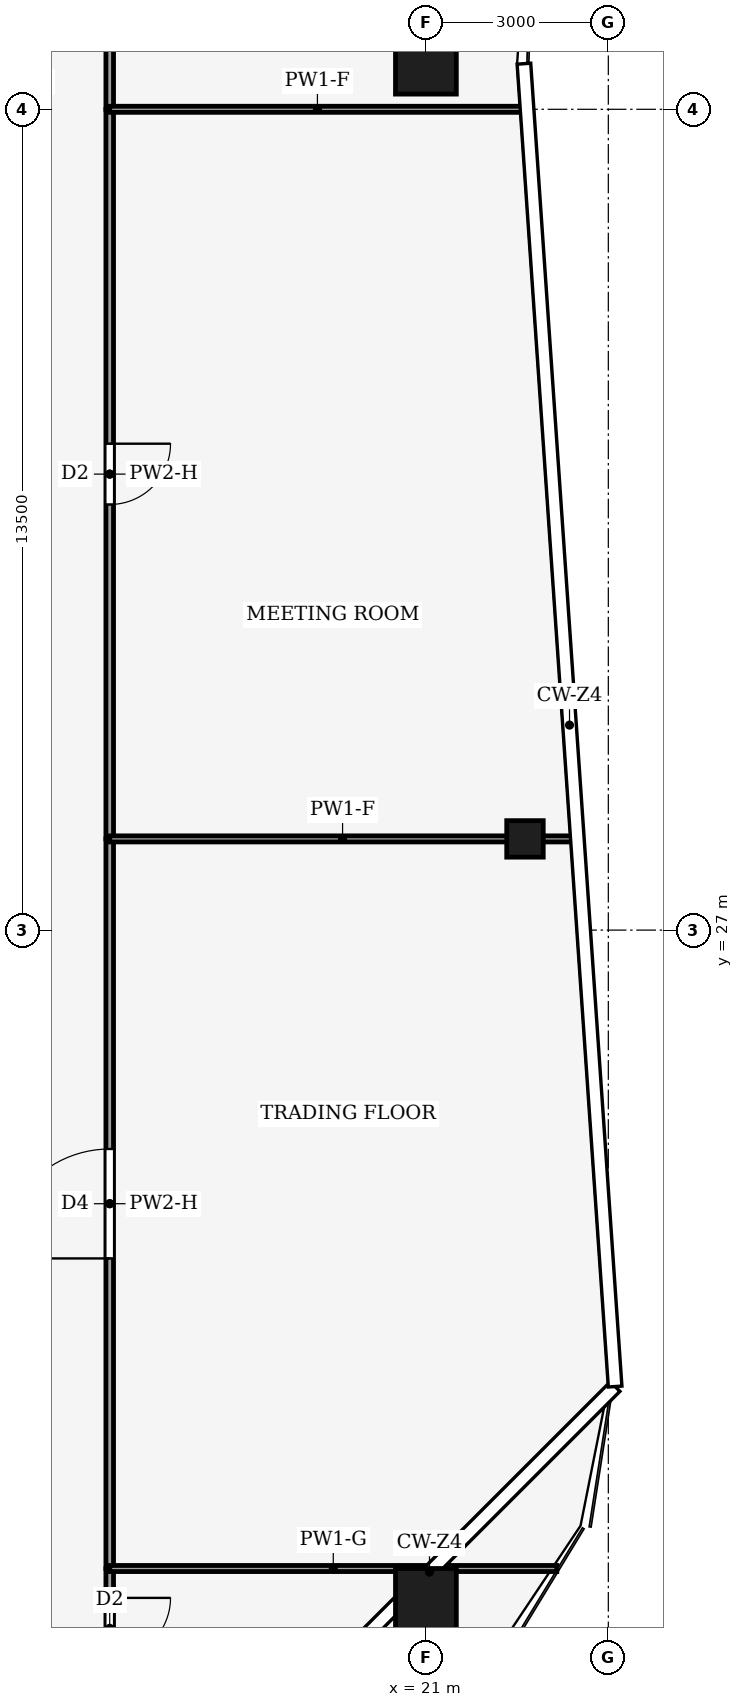
"""IFC4 building model, lengths in metres.
Left out: names, types, materials, properties, quantities, classifications, styles, units other than length and angle.
Written with IfcOpenShell. Run it as: python <this file> out.ifc"""

import sys

from ifc_helpers import new_model, si_unit, direction, frame, frame_2d, origin, origin_2d, place, context, subcontext, project, spatial, rectangle, hollow_rectangle, extrude, element, fill, save


model = new_model("IFC4")
c1 = context("Model", 3, precision=1e-05, world=origin(), true_north=direction((0.0, 1.0)))
c2 = subcontext(c1, "Body", "Model", "MODEL_VIEW")
j1 = project(units=[si_unit("LENGTHUNIT", "METRE"), si_unit("PLANEANGLEUNIT", "RADIAN")], contexts=[c1])
p1 = place(None, origin())
s1 = spatial("IfcSite", under=j1, at=p1, CompositionType="ELEMENT")
p2 = place(p1, origin())
s2 = spatial("IfcBuilding", under=s1, at=p2, CompositionType="ELEMENT")
p3 = place(p2, frame((0.0, 0.0, 254.0)))
s3 = spatial("IfcBuildingStorey", under=s2, at=p3, CompositionType="ELEMENT", Elevation=254.0)
for number, where, z_axis, x_axis in (
    (1, (21.0, 41.25, 0.0), (0.0, 0.0, 1.0), (1.0, 0.0, 0.0)),
    (2, (21.0, 16.0, 0.0), (0.0, 0.0, 1.0), (1.0, 0.0, 0.0)),
):
    element("IfcColumn", number, at=place(p3, frame(where, z_axis=z_axis, x_axis=x_axis)), inside=s3, PredefinedType="COLUMN", context=c2, shape_type="SweptSolid", body=[
        extrude(hollow_rectangle(XDim=1.0, YDim=1.0, WallThickness=0.045, at=origin_2d()), origin(), (0.0, 0.0, 1.0), 4.0),
    ])
p4 = place(p3, frame((22.629, 28.5, 0.0), z_axis=(0.0, 0.0, 1.0), x_axis=(1.0, 0.0, 0.0)))
e3 = element("IfcColumn", 3, at=p4, inside=s3, PredefinedType="COLUMN", context=c2, shape_type="SweptSolid", body=[
    extrude(hollow_rectangle(XDim=0.6, YDim=0.6, WallThickness=0.025, at=origin_2d()), origin(), (0.0, 0.0, 1.0), 4.0),
])
p5 = place(p3, frame((15.8, 16.5, 0.0), z_axis=(0.0, 0.0, 1.0), x_axis=(0.0, -1.0, 0.0)))
e4 = element("IfcWall", 4, at=p5, inside=s3, PredefinedType="PARTITIONING", context=c2, shape_type="SweptSolid", body=[
    extrude(rectangle(XDim=2.897, YDim=0.125, at=frame_2d((1.448, 0.0))), origin(), (0.0, 0.0, 1.0), 3.04),
])
p6 = place(p5, frame((0.483, 0.0, 0.0)))
e5 = element("IfcOpeningElement", 5, at=p6, cuts=e4, PredefinedType="OPENING", context=c2, shape_type="SweptSolid", body=[
    extrude(rectangle(XDim=1.0, YDim=2.1, at=frame_2d((0.5, 1.05))), frame((0.0, 0.073, 0.0), z_axis=(0.0, -1.0, 0.0), x_axis=(1.0, 0.0, 0.0)), (0.0, 0.0, 1.0), 0.145),
])
p7 = place(p3, frame((15.8, 16.5, 0.0), z_axis=(0.0, 0.0, 1.0), x_axis=(0.0, 1.0, 0.0)))
e6 = element("IfcWall", 6, at=p7, inside=s3, PredefinedType="PARTITIONING", context=c2, shape_type="SweptSolid", body=[
    extrude(rectangle(XDim=12.0, YDim=0.125, at=frame_2d((6.0, 0.0))), origin(), (0.0, 0.0, 1.0), 3.14),
])
p8 = place(p7, frame((5.1, 0.0, 0.0)))
e7 = element("IfcOpeningElement", 7, at=p8, cuts=e6, PredefinedType="OPENING", context=c2, shape_type="SweptSolid", body=[
    extrude(rectangle(XDim=1.8, YDim=2.1, at=frame_2d((0.9, 1.05))), frame((0.0, 0.073, 0.0), z_axis=(0.0, -1.0, 0.0), x_axis=(1.0, 0.0, 0.0)), (0.0, 0.0, 1.0), 0.145),
])
p9 = place(p3, frame((15.8, 40.5, 0.0), z_axis=(0.0, 0.0, 1.0), x_axis=(0.0, -1.0, 0.0)))
e8 = element("IfcWall", 8, at=p9, inside=s3, PredefinedType="PARTITIONING", context=c2, shape_type="SweptSolid", body=[
    extrude(rectangle(XDim=12.0, YDim=0.125, at=frame_2d((6.0, 0.0))), origin(), (0.0, 0.0, 1.0), 3.14),
])
p10 = place(p9, frame((5.5, 0.0, 0.0)))
e9 = element("IfcOpeningElement", 9, at=p10, cuts=e8, PredefinedType="OPENING", context=c2, shape_type="SweptSolid", body=[
    extrude(rectangle(XDim=1.0, YDim=2.1, at=frame_2d((0.5, 1.05))), frame((0.0, 0.073, 0.0), z_axis=(0.0, -1.0, 0.0), x_axis=(1.0, 0.0, 0.0)), (0.0, 0.0, 1.0), 0.145),
])
p11 = place(p3, frame((15.8, 40.5, 0.0), z_axis=(0.0, 0.0, 1.0), x_axis=(0.0, 1.0, 0.0)))
e10 = element("IfcWall", 10, at=p11, inside=s3, PredefinedType="PARTITIONING", context=c2, shape_type="SweptSolid", body=[
    extrude(rectangle(XDim=12.0, YDim=0.125, at=frame_2d((6.0, 0.0))), origin(), (0.0, 0.0, 1.0), 3.24),
])
p12 = place(p11, frame((5.1, 0.0, 0.0)))
e11 = element("IfcOpeningElement", 11, at=p12, cuts=e10, PredefinedType="OPENING", context=c2, shape_type="SweptSolid", body=[
    extrude(rectangle(XDim=1.8, YDim=2.1, at=frame_2d((0.9, 1.05))), frame((0.0, 0.073, 0.0), z_axis=(0.0, -1.0, 0.0), x_axis=(1.0, 0.0, 0.0)), (0.0, 0.0, 1.0), 0.145),
])
p13 = place(p3, frame((23.153, 16.5, 0.0), z_axis=(0.0, 0.0, 1.0), x_axis=(-1.0, 0.0, 0.0)))
e12 = element("IfcWall", 12, at=p13, inside=s3, PredefinedType="PARTITIONING", context=c2, shape_type="SweptSolid", body=[
    extrude(rectangle(XDim=7.353, YDim=0.1, at=frame_2d((3.676, 0.0))), origin(), (0.0, 0.0, 1.0), 2.93),
])
p14 = place(p3, frame((23.459, 28.5, 0.0), z_axis=(0.0, 0.0, 1.0), x_axis=(-1.0, 0.0, 0.0)))
e13 = element("IfcWall", 13, at=p14, inside=s3, PredefinedType="PARTITIONING", context=c2, shape_type="SweptSolid", body=[
    extrude(rectangle(XDim=7.659, YDim=0.1, at=frame_2d((3.83, 0.0))), origin(), (0.0, 0.0, 1.0), 3.04),
])
p15 = place(p3, frame((22.632, 40.5, 0.0), z_axis=(0.0, 0.0, 1.0), x_axis=(-1.0, 0.0, 0.0)))
e14 = element("IfcWall", 14, at=p15, inside=s3, PredefinedType="PARTITIONING", context=c2, shape_type="SweptSolid", body=[
    extrude(rectangle(XDim=6.832, YDim=0.1, at=frame_2d((3.416, 0.0))), origin(), (0.0, 0.0, 1.0), 3.04),
])
p16 = place(p6, origin())
e15 = element("IfcDoor", 15, at=p16, inside=s3, OperationType="SINGLE_SWING_LEFT", PredefinedType="DOOR", context=c2, shape_type="SweptSolid", body=[
    extrude(rectangle(XDim=1.0, YDim=2.1, at=frame_2d((0.5, 1.05))), frame((0.0, 0.025, 0.0), z_axis=(0.0, -1.0, 0.0), x_axis=(1.0, 0.0, 0.0)), (0.0, 0.0, 1.0), 0.05),
])
fill(e5, e15)
p17 = place(p8, origin())
e16 = element("IfcDoor", 16, at=p17, inside=s3, OperationType="DOUBLE_DOOR_SINGLE_SWING", PredefinedType="DOOR", context=c2, shape_type="SweptSolid", body=[
    extrude(rectangle(XDim=1.8, YDim=2.1, at=frame_2d((0.9, 1.05))), frame((0.0, 0.025, 0.0), z_axis=(0.0, -1.0, 0.0), x_axis=(1.0, 0.0, 0.0)), (0.0, 0.0, 1.0), 0.05),
])
fill(e7, e16)
p18 = place(p10, origin())
e17 = element("IfcDoor", 17, at=p18, inside=s3, OperationType="SINGLE_SWING_LEFT", PredefinedType="DOOR", context=c2, shape_type="SweptSolid", body=[
    extrude(rectangle(XDim=1.0, YDim=2.1, at=frame_2d((0.5, 1.05))), frame((0.0, 0.025, 0.0), z_axis=(0.0, -1.0, 0.0), x_axis=(1.0, 0.0, 0.0)), (0.0, 0.0, 1.0), 0.05),
])
fill(e9, e17)
save(model, sys.argv[1])
